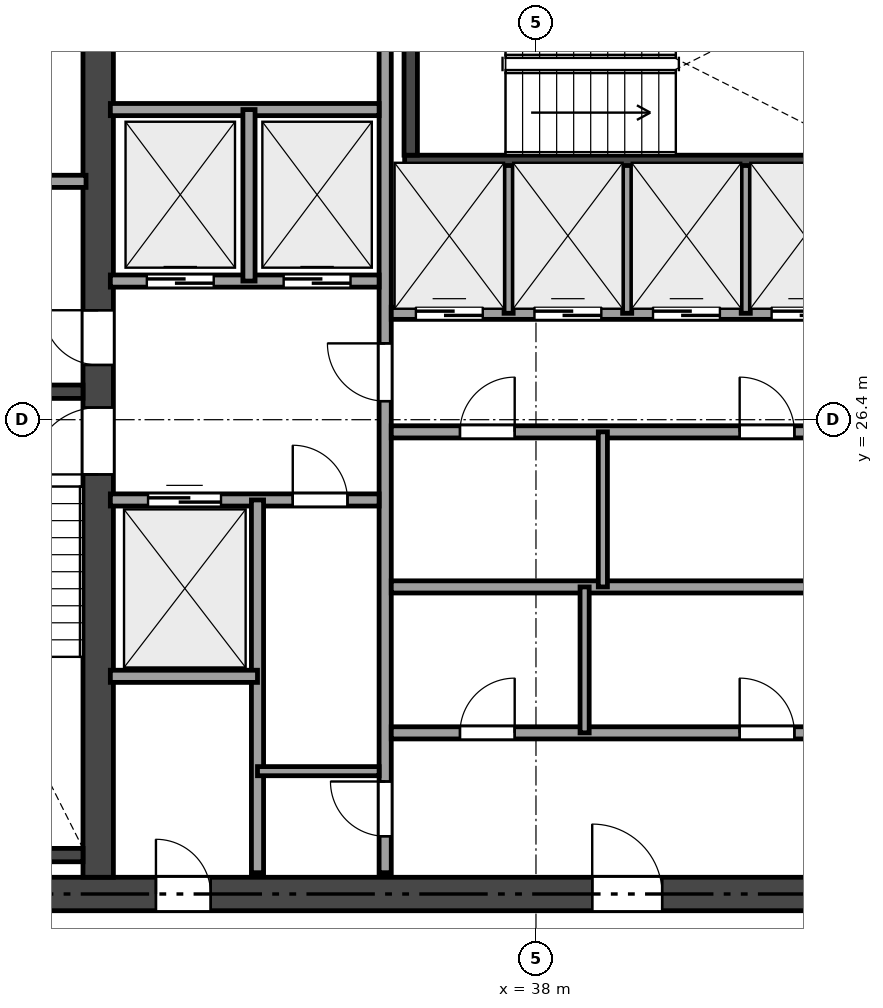
"""IFC4 building model, lengths in metres.
Left out: names, types, materials, properties, quantities, classifications, styles, units other than length and angle.
Written with IfcOpenShell. Run it as: python <this file> out.ifc"""

import sys

from ifc_helpers import new_model, si_unit, direction, frame, frame_2d, origin, place, context, subcontext, project, spatial, rectangle, extrude, element, fill, save


model = new_model("IFC4")
c1 = context("Model", 3, precision=1e-05, world=origin(), true_north=direction((0.0, 1.0)))
c2 = subcontext(c1, "Body", "Model", "MODEL_VIEW")
j1 = project(units=[si_unit("LENGTHUNIT", "METRE"), si_unit("PLANEANGLEUNIT", "RADIAN")], contexts=[c1])
p1 = place(None, origin())
s1 = spatial("IfcSite", under=j1, at=p1, CompositionType="ELEMENT")
p2 = place(p1, origin())
s2 = spatial("IfcBuilding", under=s1, at=p2, CompositionType="ELEMENT")
p3 = place(p2, frame((0.0, 0.0, 231.9)))
s3 = spatial("IfcBuildingStorey", under=s2, at=p3, CompositionType="ELEMENT", Elevation=231.9)
p4 = place(p3, frame((26.525, 18.6, 0.0), z_axis=(0.0, 0.0, 1.0), x_axis=(1.0, 0.0, 0.0)))
e1 = element("IfcWall", 1, at=p4, inside=s3, PredefinedType="SHEAR", context=c2, shape_type="SweptSolid", body=[
    extrude(rectangle(XDim=21.35, YDim=0.55, at=frame_2d((10.675, 0.0))), origin(), (0.0, 0.0, 1.0), 3.18),
])
p5 = place(p4, frame((12.4, 0.0, 0.0)))
e2 = element("IfcOpeningElement", 2, at=p5, cuts=e1, PredefinedType="OPENING", context=c2, shape_type="SweptSolid", body=[
    extrude(rectangle(XDim=1.15, YDim=2.15, at=frame_2d((0.575, 1.075))), frame((0.0, 0.285, 0.0), z_axis=(0.0, -1.0, 0.0), x_axis=(1.0, 0.0, 0.0)), (0.0, 0.0, 1.0), 0.57),
])
p6 = place(p4, frame((5.225, 0.0, 0.0)))
e3 = element("IfcOpeningElement", 3, at=p6, cuts=e1, PredefinedType="OPENING", context=c2, shape_type="SweptSolid", body=[
    extrude(rectangle(XDim=0.9, YDim=2.1, at=frame_2d((0.45, 1.05))), frame((0.0, 0.285, 0.0), z_axis=(0.0, -1.0, 0.0), x_axis=(1.0, 0.0, 0.0)), (0.0, 0.0, 1.0), 0.57),
])
p7 = place(p3, frame((30.8, 18.875, 0.0), z_axis=(0.0, 0.0, 1.0), x_axis=(0.0, 1.0, 0.0)))
e4 = element("IfcWall", 4, at=p7, inside=s3, PredefinedType="SHEAR", context=c2, shape_type="SweptSolid", body=[
    extrude(rectangle(XDim=15.05, YDim=0.5, at=frame_2d((7.525, 0.0))), origin(), (0.0, 0.0, 1.0), 3.18),
])
p8 = place(p7, frame((6.625, 0.0, 0.0)))
e5 = element("IfcOpeningElement", 5, at=p8, cuts=e4, PredefinedType="OPENING", context=c2, shape_type="SweptSolid", body=[
    extrude(rectangle(XDim=1.1, YDim=2.15, at=frame_2d((0.55, 1.075))), frame((0.0, 0.26, 0.0), z_axis=(0.0, -1.0, 0.0), x_axis=(1.0, 0.0, 0.0)), (0.0, 0.0, 1.0), 0.52),
])
p9 = place(p7, frame((8.425, 0.0, 0.0)))
e6 = element("IfcOpeningElement", 6, at=p9, cuts=e4, PredefinedType="OPENING", context=c2, shape_type="SweptSolid", body=[
    extrude(rectangle(XDim=0.9, YDim=2.1, at=frame_2d((0.45, 1.05))), frame((0.0, 0.26, 0.0), z_axis=(0.0, -1.0, 0.0), x_axis=(1.0, 0.0, 0.0)), (0.0, 0.0, 1.0), 0.52),
])
for number, where, z_axis, x_axis in (
    (7, (27.075, 26.86, 0.0), (0.0, 0.0, 1.0), (1.0, 0.0, 0.0)),
    (8, (27.075, 19.24, 0.0), (0.0, 0.0, 1.0), (1.0, 0.0, 0.0)),
):
    element("IfcWall", number, at=place(p3, frame(where, z_axis=z_axis, x_axis=x_axis)), inside=s3, PredefinedType="SHEAR", context=c2, shape_type="SweptSolid", body=[
        extrude(rectangle(XDim=3.475, YDim=0.22, at=frame_2d((1.738, 0.0))), origin(), (0.0, 0.0, 1.0), 3.18),
    ])
p10 = place(p3, frame((35.84, 30.64, 0.0), z_axis=(0.0, 0.0, 1.0), x_axis=(1.0, 0.0, 0.0)))
e9 = element("IfcWall", 9, at=p10, inside=s3, PredefinedType="SHEAR", context=c2, shape_type="SweptSolid", body=[
    extrude(rectangle(XDim=7.61, YDim=0.22, at=frame_2d((3.805, 0.0))), origin(), (0.0, 0.0, 1.0), 3.18),
])
p11 = place(p3, frame((35.94, 30.75, 0.0), z_axis=(0.0, 0.0, 1.0), x_axis=(0.0, 1.0, 0.0)))
e10 = element("IfcWall", 10, at=p11, inside=s3, PredefinedType="SHEAR", context=c2, shape_type="SweptSolid", body=[
    extrude(rectangle(XDim=3.175, YDim=0.22, at=frame_2d((1.587, 0.0))), origin(), (0.0, 0.0, 1.0), 3.18),
])
p12 = place(p3, frame((27.15, 30.32, 0.0), z_axis=(0.0, 0.0, 1.0), x_axis=(1.0, 0.0, 0.0)))
e11 = element("IfcWall", 11, at=p12, inside=s3, PredefinedType="SOLIDWALL", context=c2, shape_type="SweptSolid", body=[
    extrude(rectangle(XDim=3.45, YDim=0.2, at=frame_2d((1.725, 0.0))), origin(), (0.0, 0.0, 1.0), 3.18),
])
p13 = place(p3, frame((35.52, 18.95, 0.0), z_axis=(0.0, 0.0, 1.0), x_axis=(0.0, 1.0, 0.0)))
e12 = element("IfcWall", 12, at=p13, inside=s3, PredefinedType="SOLIDWALL", context=c2, shape_type="SweptSolid", body=[
    extrude(rectangle(XDim=14.9, YDim=0.2, at=frame_2d((7.45, 0.0))), origin(), (0.0, 0.0, 1.0), 2.701),
])
p14 = place(p13, frame((7.755, 0.0, 0.0)))
e13 = element("IfcOpeningElement", 13, at=p14, cuts=e12, PredefinedType="OPENING", context=c2, shape_type="SweptSolid", body=[
    extrude(rectangle(XDim=0.95, YDim=2.15, at=frame_2d((0.475, 1.075))), frame((0.0, 0.11, 0.0), z_axis=(0.0, -1.0, 0.0), x_axis=(1.0, 0.0, 0.0)), (0.0, 0.0, 1.0), 0.22),
])
p15 = place(p13, frame((0.6, 0.0, 0.0)))
e14 = element("IfcOpeningElement", 14, at=p15, cuts=e12, PredefinedType="OPENING", context=c2, shape_type="SweptSolid", body=[
    extrude(rectangle(XDim=0.9, YDim=2.1, at=frame_2d((0.45, 1.05))), frame((0.0, 0.11, 0.0), z_axis=(0.0, -1.0, 0.0), x_axis=(1.0, 0.0, 0.0)), (0.0, 0.0, 1.0), 0.22),
])
p16 = place(p3, frame((31.0, 28.68, 0.0), z_axis=(0.0, 0.0, 1.0), x_axis=(1.0, 0.0, 0.0)))
e15 = element("IfcWall", 15, at=p16, inside=s3, PredefinedType="SOLIDWALL", context=c2, shape_type="SweptSolid", body=[
    extrude(rectangle(XDim=4.42, YDim=0.2, at=frame_2d((2.21, 0.0))), origin(), (0.0, 0.0, 1.0), 3.18),
])
p17 = place(p16, frame((0.6, 0.0, 0.0)))
e16 = element("IfcOpeningElement", 16, at=p17, cuts=e15, PredefinedType="OPENING", context=c2, shape_type="SweptSolid", body=[
    extrude(rectangle(XDim=1.1, YDim=2.15, at=frame_2d((0.55, 1.075))), frame((0.0, 0.11, 0.0), z_axis=(0.0, -1.0, 0.0), x_axis=(1.0, 0.0, 0.0)), (0.0, 0.0, 1.0), 0.22),
])
p18 = place(p16, frame((2.85, 0.0, 0.0)))
e17 = element("IfcOpeningElement", 17, at=p18, cuts=e15, PredefinedType="OPENING", context=c2, shape_type="SweptSolid", body=[
    extrude(rectangle(XDim=1.1, YDim=2.15, at=frame_2d((0.55, 1.075))), frame((0.0, 0.11, 0.0), z_axis=(0.0, -1.0, 0.0), x_axis=(1.0, 0.0, 0.0)), (0.0, 0.0, 1.0), 0.22),
])
p19 = place(p3, frame((31.0, 31.5, 0.0), z_axis=(0.0, 0.0, 1.0), x_axis=(1.0, 0.0, 0.0)))
e18 = element("IfcWall", 18, at=p19, inside=s3, PredefinedType="SOLIDWALL", context=c2, shape_type="SweptSolid", body=[
    extrude(rectangle(XDim=4.42, YDim=0.2, at=frame_2d((2.21, 0.0))), origin(), (0.0, 0.0, 1.0), 3.18),
])
p20 = place(p3, frame((33.28, 28.68, 0.0), z_axis=(0.0, 0.0, 1.0), x_axis=(0.0, 1.0, 0.0)))
e19 = element("IfcWall", 19, at=p20, inside=s3, PredefinedType="SOLIDWALL", context=c2, shape_type="SweptSolid", body=[
    extrude(rectangle(XDim=2.82, YDim=0.2, at=frame_2d((1.41, 0.0))), origin(), (0.0, 0.0, 1.0), 3.18),
])
p21 = place(p3, frame((31.0, 25.08, 0.0), z_axis=(0.0, 0.0, 1.0), x_axis=(1.0, 0.0, 0.0)))
e20 = element("IfcWall", 20, at=p21, inside=s3, PredefinedType="SOLIDWALL", context=c2, shape_type="SweptSolid", body=[
    extrude(rectangle(XDim=4.42, YDim=0.2, at=frame_2d((2.21, 0.0))), origin(), (0.0, 0.0, 1.0), 3.18),
])
p22 = place(p21, frame((3.0, 0.0, 0.0)))
e21 = element("IfcOpeningElement", 21, at=p22, cuts=e20, PredefinedType="OPENING", context=c2, shape_type="SweptSolid", body=[
    extrude(rectangle(XDim=0.9, YDim=2.1, at=frame_2d((0.45, 1.05))), frame((0.0, 0.11, 0.0), z_axis=(0.0, -1.0, 0.0), x_axis=(1.0, 0.0, 0.0)), (0.0, 0.0, 1.0), 0.22),
])
p23 = place(p21, frame((0.62, 0.0, 0.0)))
e22 = element("IfcOpeningElement", 22, at=p23, cuts=e20, PredefinedType="OPENING", context=c2, shape_type="SweptSolid", body=[
    extrude(rectangle(XDim=1.2, YDim=2.15, at=frame_2d((0.6, 1.075))), frame((0.0, 0.11, 0.0), z_axis=(0.0, -1.0, 0.0), x_axis=(1.0, 0.0, 0.0)), (0.0, 0.0, 1.0), 0.22),
])
p24 = place(p3, frame((33.42, 18.95, 0.0), z_axis=(0.0, 0.0, 1.0), x_axis=(0.0, 1.0, 0.0)))
e23 = element("IfcWall", 23, at=p24, inside=s3, PredefinedType="SOLIDWALL", context=c2, shape_type="SweptSolid", body=[
    extrude(rectangle(XDim=6.13, YDim=0.2, at=frame_2d((3.065, 0.0))), origin(), (0.0, 0.0, 1.0), 2.701),
])
p25 = place(p3, frame((31.0, 22.18, 0.0), z_axis=(0.0, 0.0, 1.0), x_axis=(1.0, 0.0, 0.0)))
e24 = element("IfcWall", 24, at=p25, inside=s3, PredefinedType="SOLIDWALL", context=c2, shape_type="SweptSolid", body=[
    extrude(rectangle(XDim=2.42, YDim=0.2, at=frame_2d((1.21, 0.0))), origin(), (0.0, 0.0, 1.0), 3.18),
])
p26 = place(p3, frame((33.42, 20.62, 0.0), z_axis=(0.0, 0.0, 1.0), x_axis=(1.0, 0.0, 0.0)))
e25 = element("IfcWall", 25, at=p26, inside=s3, PredefinedType="PARTITIONING", context=c2, shape_type="SweptSolid", body=[
    extrude(rectangle(XDim=2.0, YDim=0.15, at=frame_2d((1.0, 0.0))), origin(), (0.0, 0.0, 1.0), 3.18),
])
p27 = place(p3, frame((35.62, 28.15, 0.0), z_axis=(0.0, 0.0, 1.0), x_axis=(1.0, 0.0, 0.0)))
e26 = element("IfcWall", 26, at=p27, inside=s3, PredefinedType="SOLIDWALL", context=c2, shape_type="SweptSolid", body=[
    extrude(rectangle(XDim=7.88, YDim=0.2, at=frame_2d((3.94, 0.0))), origin(), (0.0, 0.0, 1.0), 3.18),
])
p28 = place(p27, frame((0.405, 0.0, 0.0)))
e27 = element("IfcOpeningElement", 27, at=p28, cuts=e26, PredefinedType="OPENING", context=c2, shape_type="SweptSolid", body=[
    extrude(rectangle(XDim=1.1, YDim=2.15, at=frame_2d((0.55, 1.075))), frame((0.0, 0.11, 0.0), z_axis=(0.0, -1.0, 0.0), x_axis=(1.0, 0.0, 0.0)), (0.0, 0.0, 1.0), 0.22),
])
p29 = place(p27, frame((2.355, 0.0, 0.0)))
e28 = element("IfcOpeningElement", 28, at=p29, cuts=e26, PredefinedType="OPENING", context=c2, shape_type="SweptSolid", body=[
    extrude(rectangle(XDim=1.1, YDim=2.15, at=frame_2d((0.55, 1.075))), frame((0.0, 0.11, 0.0), z_axis=(0.0, -1.0, 0.0), x_axis=(1.0, 0.0, 0.0)), (0.0, 0.0, 1.0), 0.22),
])
p30 = place(p27, frame((4.305, 0.0, 0.0)))
e29 = element("IfcOpeningElement", 29, at=p30, cuts=e26, PredefinedType="OPENING", context=c2, shape_type="SweptSolid", body=[
    extrude(rectangle(XDim=1.1, YDim=2.15, at=frame_2d((0.55, 1.075))), frame((0.0, 0.11, 0.0), z_axis=(0.0, -1.0, 0.0), x_axis=(1.0, 0.0, 0.0)), (0.0, 0.0, 1.0), 0.22),
])
p31 = place(p27, frame((6.255, 0.0, 0.0)))
e30 = element("IfcOpeningElement", 30, at=p31, cuts=e26, PredefinedType="OPENING", context=c2, shape_type="SweptSolid", body=[
    extrude(rectangle(XDim=1.1, YDim=2.15, at=frame_2d((0.55, 1.075))), frame((0.0, 0.11, 0.0), z_axis=(0.0, -1.0, 0.0), x_axis=(1.0, 0.0, 0.0)), (0.0, 0.0, 1.0), 0.22),
])
p32 = place(p3, frame((35.62, 26.2, 0.0), z_axis=(0.0, 0.0, 1.0), x_axis=(1.0, 0.0, 0.0)))
e31 = element("IfcWall", 31, at=p32, inside=s3, PredefinedType="SOLIDWALL", context=c2, shape_type="SweptSolid", body=[
    extrude(rectangle(XDim=7.88, YDim=0.2, at=frame_2d((3.94, 0.0))), origin(), (0.0, 0.0, 1.0), 3.18),
])
p33 = place(p32, frame((1.13, 0.0, 0.0)))
e32 = element("IfcOpeningElement", 32, at=p33, cuts=e31, PredefinedType="OPENING", context=c2, shape_type="SweptSolid", body=[
    extrude(rectangle(XDim=0.9, YDim=2.1, at=frame_2d((0.45, 1.05))), frame((0.0, 0.11, 0.0), z_axis=(0.0, -1.0, 0.0), x_axis=(1.0, 0.0, 0.0)), (0.0, 0.0, 1.0), 0.22),
])
p34 = place(p32, frame((5.73, 0.0, 0.0)))
e33 = element("IfcOpeningElement", 33, at=p34, cuts=e31, PredefinedType="OPENING", context=c2, shape_type="SweptSolid", body=[
    extrude(rectangle(XDim=0.9, YDim=2.1, at=frame_2d((0.45, 1.05))), frame((0.0, 0.11, 0.0), z_axis=(0.0, -1.0, 0.0), x_axis=(1.0, 0.0, 0.0)), (0.0, 0.0, 1.0), 0.22),
])
p35 = place(p3, frame((35.62, 23.65, 0.0), z_axis=(0.0, 0.0, 1.0), x_axis=(1.0, 0.0, 0.0)))
e34 = element("IfcWall", 34, at=p35, inside=s3, PredefinedType="SOLIDWALL", context=c2, shape_type="SweptSolid", body=[
    extrude(rectangle(XDim=7.88, YDim=0.2, at=frame_2d((3.94, 0.0))), origin(), (0.0, 0.0, 1.0), 2.701),
])
p36 = place(p3, frame((35.62, 21.25, 0.0), z_axis=(0.0, 0.0, 1.0), x_axis=(1.0, 0.0, 0.0)))
e35 = element("IfcWall", 35, at=p36, inside=s3, PredefinedType="SOLIDWALL", context=c2, shape_type="SweptSolid", body=[
    extrude(rectangle(XDim=7.88, YDim=0.2, at=frame_2d((3.94, 0.0))), origin(), (0.0, 0.0, 1.0), 3.18),
])
p37 = place(p36, frame((1.13, 0.0, 0.0)))
e36 = element("IfcOpeningElement", 36, at=p37, cuts=e35, PredefinedType="OPENING", context=c2, shape_type="SweptSolid", body=[
    extrude(rectangle(XDim=0.9, YDim=2.1, at=frame_2d((0.45, 1.05))), frame((0.0, 0.11, 0.0), z_axis=(0.0, -1.0, 0.0), x_axis=(1.0, 0.0, 0.0)), (0.0, 0.0, 1.0), 0.22),
])
p38 = place(p36, frame((5.73, 0.0, 0.0)))
e37 = element("IfcOpeningElement", 37, at=p38, cuts=e35, PredefinedType="OPENING", context=c2, shape_type="SweptSolid", body=[
    extrude(rectangle(XDim=0.9, YDim=2.1, at=frame_2d((0.45, 1.05))), frame((0.0, 0.11, 0.0), z_axis=(0.0, -1.0, 0.0), x_axis=(1.0, 0.0, 0.0)), (0.0, 0.0, 1.0), 0.22),
])
for number, where, z_axis, x_axis in (
    (38, (37.55, 28.15, 0.0), (0.0, 0.0, 1.0), (0.0, 1.0, 0.0)),
    (39, (39.5, 28.15, 0.0), (0.0, 0.0, 1.0), (0.0, 1.0, 0.0)),
    (40, (41.45, 28.15, 0.0), (0.0, 0.0, 1.0), (0.0, 1.0, 0.0)),
):
    element("IfcWall", number, at=place(p3, frame(where, z_axis=z_axis, x_axis=x_axis)), inside=s3, PredefinedType="PARTITIONING", context=c2, shape_type="SweptSolid", body=[
        extrude(rectangle(XDim=2.43, YDim=0.15, at=frame_2d((1.215, 0.0))), origin(), (0.0, 0.0, 1.0), 3.18),
    ])
p39 = place(p3, frame((39.1, 23.65, 0.0), z_axis=(0.0, 0.0, 1.0), x_axis=(0.0, 1.0, 0.0)))
e41 = element("IfcWall", 41, at=p39, inside=s3, PredefinedType="PARTITIONING", context=c2, shape_type="SweptSolid", body=[
    extrude(rectangle(XDim=2.55, YDim=0.15, at=frame_2d((1.275, 0.0))), origin(), (0.0, 0.0, 1.0), 2.701),
])
p40 = place(p3, frame((38.8, 21.25, 0.0), z_axis=(0.0, 0.0, 1.0), x_axis=(0.0, 1.0, 0.0)))
e42 = element("IfcWall", 42, at=p40, inside=s3, PredefinedType="PARTITIONING", context=c2, shape_type="SweptSolid", body=[
    extrude(rectangle(XDim=2.4, YDim=0.15, at=frame_2d((1.2, 0.0))), origin(), (0.0, 0.0, 1.0), 2.701),
])
p41 = place(p8, origin())
e43 = element("IfcDoor", 43, at=p41, inside=s3, OperationType="SINGLE_SWING_LEFT", PredefinedType="DOOR", context=c2, shape_type="SweptSolid", body=[
    extrude(rectangle(XDim=1.1, YDim=2.15, at=frame_2d((0.55, 1.075))), frame((0.0, 0.025, 0.0), z_axis=(0.0, -1.0, 0.0), x_axis=(1.0, 0.0, 0.0)), (0.0, 0.0, 1.0), 0.05),
])
fill(e5, e43)
p42 = place(p14, origin())
e44 = element("IfcDoor", 44, at=p42, inside=s3, OperationType="SINGLE_SWING_RIGHT", PredefinedType="DOOR", context=c2, shape_type="SweptSolid", body=[
    extrude(rectangle(XDim=0.95, YDim=2.15, at=frame_2d((0.475, 1.075))), frame((0.0, 0.025, 0.0), z_axis=(0.0, -1.0, 0.0), x_axis=(1.0, 0.0, 0.0)), (0.0, 0.0, 1.0), 0.05),
])
fill(e13, e44)
p43 = place(p5, origin())
e45 = element("IfcDoor", 45, at=p43, inside=s3, OperationType="SINGLE_SWING_LEFT", PredefinedType="DOOR", context=c2, shape_type="SweptSolid", body=[
    extrude(rectangle(XDim=1.15, YDim=2.15, at=frame_2d((0.575, 1.075))), frame((0.0, 0.025, 0.0), z_axis=(0.0, -1.0, 0.0), x_axis=(1.0, 0.0, 0.0)), (0.0, 0.0, 1.0), 0.05),
])
fill(e2, e45)
p44 = place(p9, origin())
e46 = element("IfcDoor", 46, at=p44, inside=s3, OperationType="SINGLE_SWING_RIGHT", PredefinedType="DOOR", context=c2, shape_type="SweptSolid", body=[
    extrude(rectangle(XDim=0.9, YDim=2.1, at=frame_2d((0.45, 1.05))), frame((0.0, 0.025, 0.0), z_axis=(0.0, -1.0, 0.0), x_axis=(1.0, 0.0, 0.0)), (0.0, 0.0, 1.0), 0.05),
])
fill(e6, e46)
p45 = place(p6, origin())
e47 = element("IfcDoor", 47, at=p45, inside=s3, OperationType="SINGLE_SWING_LEFT", PredefinedType="DOOR", context=c2, shape_type="SweptSolid", body=[
    extrude(rectangle(XDim=0.9, YDim=2.1, at=frame_2d((0.45, 1.05))), frame((0.0, 0.025, 0.0), z_axis=(0.0, -1.0, 0.0), x_axis=(1.0, 0.0, 0.0)), (0.0, 0.0, 1.0), 0.05),
])
fill(e3, e47)
p46 = place(p15, origin())
e48 = element("IfcDoor", 48, at=p46, inside=s3, OperationType="SINGLE_SWING_RIGHT", PredefinedType="DOOR", context=c2, shape_type="SweptSolid", body=[
    extrude(rectangle(XDim=0.9, YDim=2.1, at=frame_2d((0.45, 1.05))), frame((0.0, 0.025, 0.0), z_axis=(0.0, -1.0, 0.0), x_axis=(1.0, 0.0, 0.0)), (0.0, 0.0, 1.0), 0.05),
])
fill(e14, e48)
p47 = place(p22, origin())
e49 = element("IfcDoor", 49, at=p47, inside=s3, OperationType="SINGLE_SWING_LEFT", PredefinedType="DOOR", context=c2, shape_type="SweptSolid", body=[
    extrude(rectangle(XDim=0.9, YDim=2.1, at=frame_2d((0.45, 1.05))), frame((0.0, 0.025, 0.0), z_axis=(0.0, -1.0, 0.0), x_axis=(1.0, 0.0, 0.0)), (0.0, 0.0, 1.0), 0.05),
])
fill(e21, e49)
p48 = place(p37, origin())
e50 = element("IfcDoor", 50, at=p48, inside=s3, OperationType="SINGLE_SWING_RIGHT", PredefinedType="DOOR", context=c2, shape_type="SweptSolid", body=[
    extrude(rectangle(XDim=0.9, YDim=2.1, at=frame_2d((0.45, 1.05))), frame((0.0, 0.025, 0.0), z_axis=(0.0, -1.0, 0.0), x_axis=(1.0, 0.0, 0.0)), (0.0, 0.0, 1.0), 0.05),
])
fill(e36, e50)
p49 = place(p38, origin())
e51 = element("IfcDoor", 51, at=p49, inside=s3, OperationType="SINGLE_SWING_LEFT", PredefinedType="DOOR", context=c2, shape_type="SweptSolid", body=[
    extrude(rectangle(XDim=0.9, YDim=2.1, at=frame_2d((0.45, 1.05))), frame((0.0, 0.025, 0.0), z_axis=(0.0, -1.0, 0.0), x_axis=(1.0, 0.0, 0.0)), (0.0, 0.0, 1.0), 0.05),
])
fill(e37, e51)
p50 = place(p33, origin())
e52 = element("IfcDoor", 52, at=p50, inside=s3, OperationType="SINGLE_SWING_RIGHT", PredefinedType="DOOR", context=c2, shape_type="SweptSolid", body=[
    extrude(rectangle(XDim=0.9, YDim=2.1, at=frame_2d((0.45, 1.05))), frame((0.0, 0.025, 0.0), z_axis=(0.0, -1.0, 0.0), x_axis=(1.0, 0.0, 0.0)), (0.0, 0.0, 1.0), 0.05),
])
fill(e32, e52)
p51 = place(p34, origin())
e53 = element("IfcDoor", 53, at=p51, inside=s3, OperationType="SINGLE_SWING_LEFT", PredefinedType="DOOR", context=c2, shape_type="SweptSolid", body=[
    extrude(rectangle(XDim=0.9, YDim=2.1, at=frame_2d((0.45, 1.05))), frame((0.0, 0.025, 0.0), z_axis=(0.0, -1.0, 0.0), x_axis=(1.0, 0.0, 0.0)), (0.0, 0.0, 1.0), 0.05),
])
fill(e33, e53)
p52 = place(p17, origin())
e54 = element("IfcDoor", 54, at=p52, inside=s3, OperationType="SLIDING_TO_LEFT", PredefinedType="DOOR", context=c2, shape_type="SweptSolid", body=[
    extrude(rectangle(XDim=1.1, YDim=2.15, at=frame_2d((0.55, 1.075))), frame((0.0, 0.025, 0.0), z_axis=(0.0, -1.0, 0.0), x_axis=(1.0, 0.0, 0.0)), (0.0, 0.0, 1.0), 0.05),
])
fill(e16, e54)
p53 = place(p18, origin())
e55 = element("IfcDoor", 55, at=p53, inside=s3, OperationType="SLIDING_TO_LEFT", PredefinedType="DOOR", context=c2, shape_type="SweptSolid", body=[
    extrude(rectangle(XDim=1.1, YDim=2.15, at=frame_2d((0.55, 1.075))), frame((0.0, 0.025, 0.0), z_axis=(0.0, -1.0, 0.0), x_axis=(1.0, 0.0, 0.0)), (0.0, 0.0, 1.0), 0.05),
])
fill(e17, e55)
p54 = place(p23, origin())
e56 = element("IfcDoor", 56, at=p54, inside=s3, OperationType="SLIDING_TO_LEFT", PredefinedType="DOOR", context=c2, shape_type="SweptSolid", body=[
    extrude(rectangle(XDim=1.2, YDim=2.15, at=frame_2d((0.6, 1.075))), frame((0.0, 0.025, 0.0), z_axis=(0.0, -1.0, 0.0), x_axis=(1.0, 0.0, 0.0)), (0.0, 0.0, 1.0), 0.05),
])
fill(e22, e56)
p55 = place(p28, origin())
e57 = element("IfcDoor", 57, at=p55, inside=s3, OperationType="SLIDING_TO_LEFT", PredefinedType="DOOR", context=c2, shape_type="SweptSolid", body=[
    extrude(rectangle(XDim=1.1, YDim=2.15, at=frame_2d((0.55, 1.075))), frame((0.0, 0.025, 0.0), z_axis=(0.0, -1.0, 0.0), x_axis=(1.0, 0.0, 0.0)), (0.0, 0.0, 1.0), 0.05),
])
fill(e27, e57)
p56 = place(p29, origin())
e58 = element("IfcDoor", 58, at=p56, inside=s3, OperationType="SLIDING_TO_LEFT", PredefinedType="DOOR", context=c2, shape_type="SweptSolid", body=[
    extrude(rectangle(XDim=1.1, YDim=2.15, at=frame_2d((0.55, 1.075))), frame((0.0, 0.025, 0.0), z_axis=(0.0, -1.0, 0.0), x_axis=(1.0, 0.0, 0.0)), (0.0, 0.0, 1.0), 0.05),
])
fill(e28, e58)
p57 = place(p30, origin())
e59 = element("IfcDoor", 59, at=p57, inside=s3, OperationType="SLIDING_TO_LEFT", PredefinedType="DOOR", context=c2, shape_type="SweptSolid", body=[
    extrude(rectangle(XDim=1.1, YDim=2.15, at=frame_2d((0.55, 1.075))), frame((0.0, 0.025, 0.0), z_axis=(0.0, -1.0, 0.0), x_axis=(1.0, 0.0, 0.0)), (0.0, 0.0, 1.0), 0.05),
])
fill(e29, e59)
p58 = place(p31, origin())
e60 = element("IfcDoor", 60, at=p58, inside=s3, OperationType="SLIDING_TO_LEFT", PredefinedType="DOOR", context=c2, shape_type="SweptSolid", body=[
    extrude(rectangle(XDim=1.1, YDim=2.15, at=frame_2d((0.55, 1.075))), frame((0.0, 0.025, 0.0), z_axis=(0.0, -1.0, 0.0), x_axis=(1.0, 0.0, 0.0)), (0.0, 0.0, 1.0), 0.05),
])
fill(e30, e60)
save(model, sys.argv[1])
